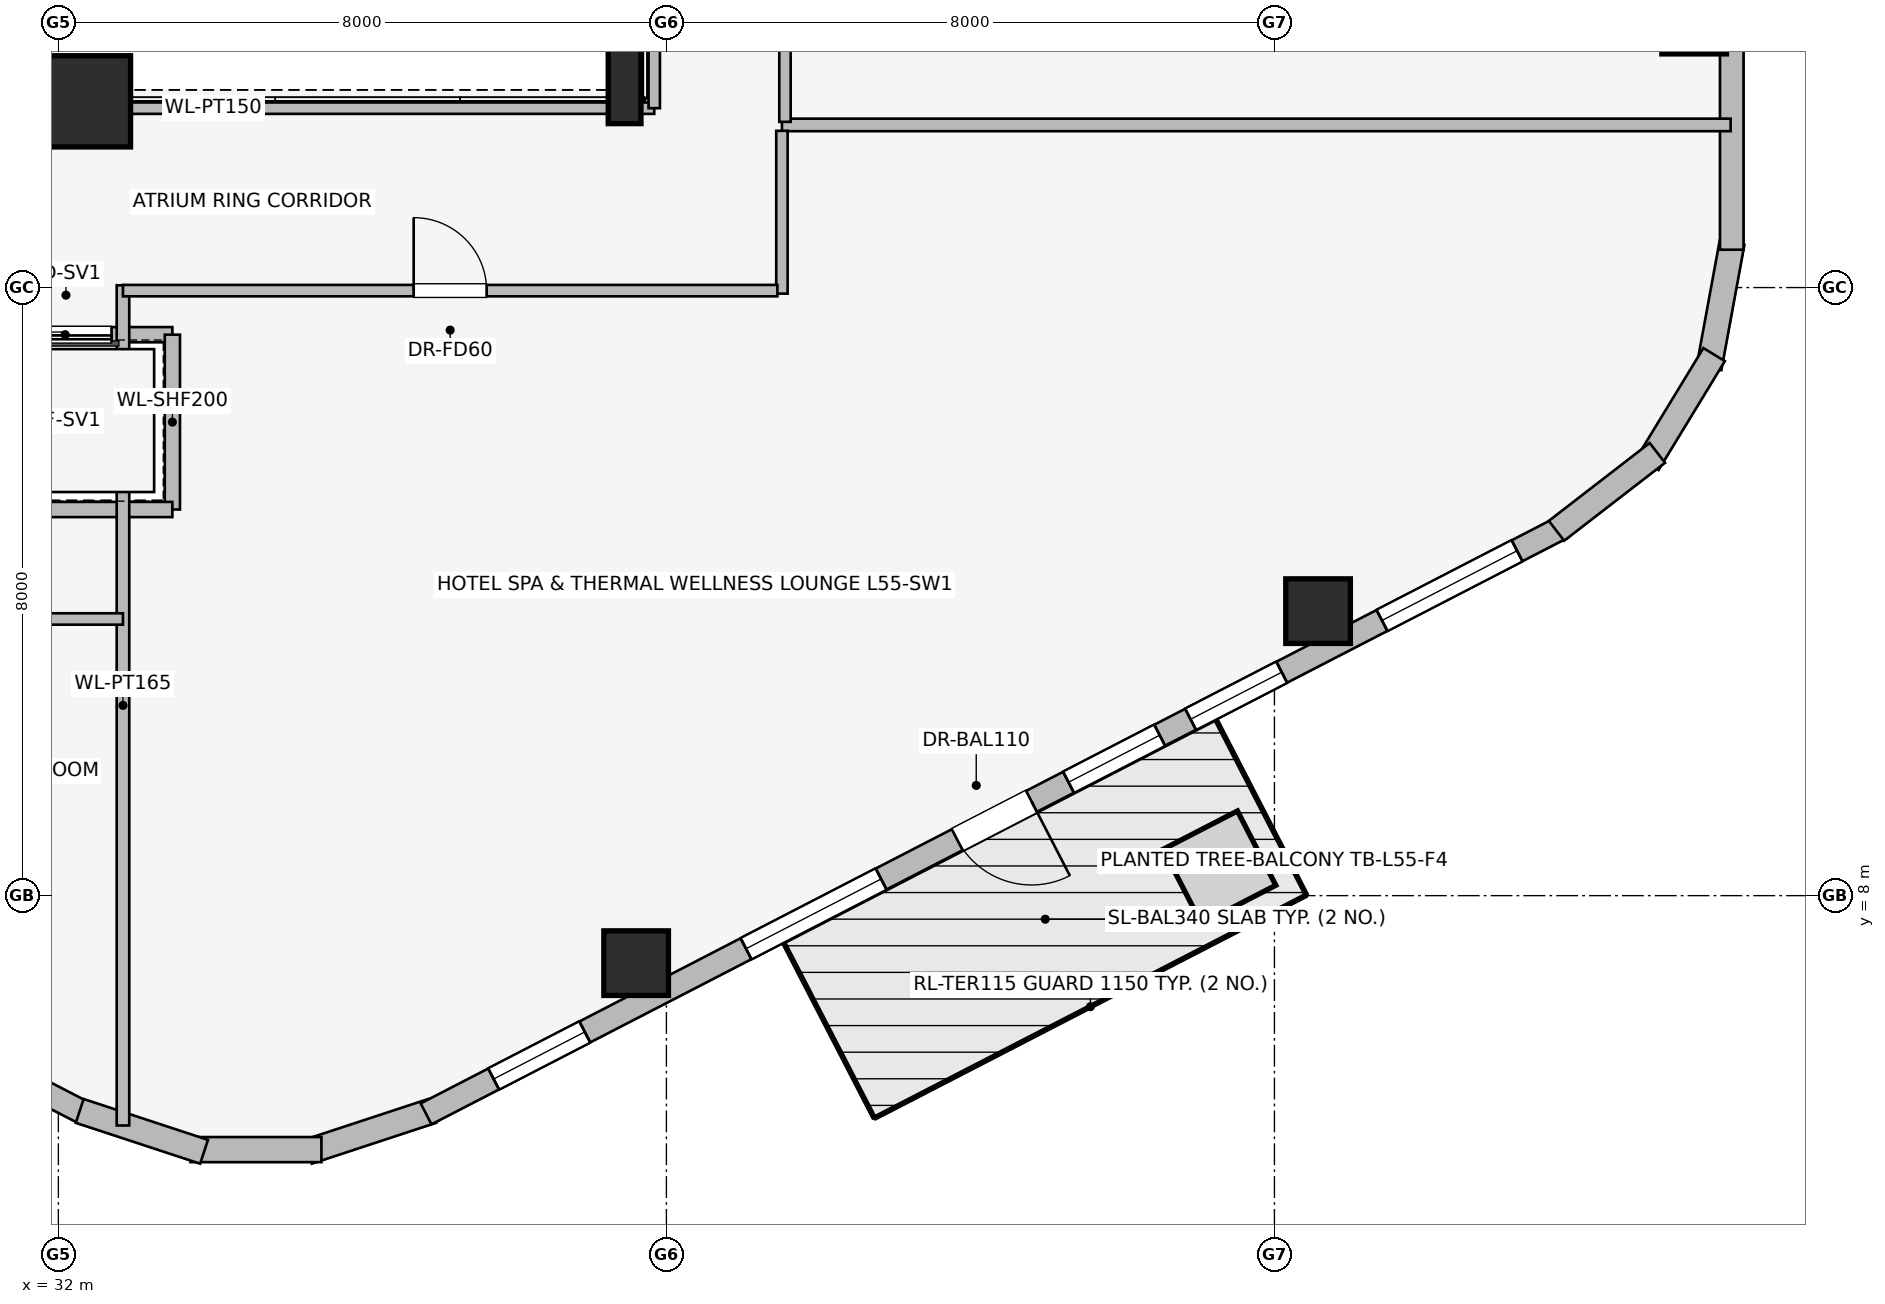
"""IFC4 building model, lengths in metres.
Left out: names, types, materials, properties, quantities, classifications, styles, units other than length and angle.
Written with IfcOpenShell. Run it as: python <this file> out.ifc"""

import sys

from ifc_helpers import new_model, si_unit, direction, frame, frame_2d, origin, origin_2d, place, context, subcontext, project, spatial, rectangle, i_section, extrude, element, fill, save


model = new_model("IFC4")
c1 = context("Model", 3, precision=1e-05, world=origin(), true_north=direction((0.0, 1.0)))
c2 = subcontext(c1, "Body", "Model", "MODEL_VIEW")
j1 = project(units=[si_unit("LENGTHUNIT", "METRE"), si_unit("PLANEANGLEUNIT", "RADIAN")], contexts=[c1])
p1 = place(None, origin())
s1 = spatial("IfcSite", under=j1, at=p1, CompositionType="ELEMENT")
p2 = place(p1, origin())
s2 = spatial("IfcBuilding", under=s1, at=p2, CompositionType="ELEMENT")
p3 = place(p2, frame((0.0, 0.0, 203.35)))
s3 = spatial("IfcBuildingStorey", under=s2, at=p3, CompositionType="ELEMENT", Elevation=203.35)
p4 = place(p3, frame((32.35, 18.45, 0.0), z_axis=(0.0, 0.0, 1.0), x_axis=(1.0, 0.0, 0.0)))
e1 = element("IfcColumn", 1, at=p4, inside=s3, PredefinedType="COLUMN", context=c2, shape_type="SweptSolid", body=[
    extrude(rectangle(XDim=1.2, YDim=1.2, at=origin_2d()), origin(), (0.0, 0.0, 1.0), 3.45),
])
for number, where, z_axis, x_axis in (
    (2, (39.602, 7.112, 0.0), (0.0, 0.0, 1.0), (1.0, 0.0, 0.0)),
    (3, (48.574, 11.743, 0.0), (0.0, 0.0, 1.0), (1.0, 0.0, 0.0)),
    (4, (53.522, 19.499, 0.0), (0.0, 0.0, 1.0), (1.0, 0.0, 0.0)),
):
    element("IfcColumn", number, at=place(p3, frame(where, z_axis=z_axis, x_axis=x_axis)), inside=s3, PredefinedType="COLUMN", context=c2, shape_type="SweptSolid", body=[
        extrude(rectangle(XDim=0.85, YDim=0.85, at=origin_2d()), origin(), (0.0, 0.0, 1.0), 3.45),
    ])
p5 = place(p3, frame((39.45, 18.65, 0.0), z_axis=(0.0, 0.0, 1.0), x_axis=(1.0, 0.0, 0.0)))
e5 = element("IfcColumn", 5, at=p5, inside=s3, PredefinedType="COLUMN", context=c2, shape_type="SweptSolid", body=[
    extrude(i_section(OverallWidth=0.431, OverallDepth=0.987, WebThickness=0.034, FlangeThickness=0.062, at=origin_2d()), origin(), (0.0, 0.0, 1.0), 3.45),
])
p6 = place(p3, frame((32.362, 5.129, 0.0), z_axis=(0.0, 0.0, 1.0), x_axis=(-0.888626188278, 0.458632202867, 0.0)))
e6 = element("IfcWall", 6, at=p6, inside=s3, PredefinedType="STANDARD", context=c2, shape_type="SweptSolid", body=[
    extrude(rectangle(XDim=16.828, YDim=0.31, at=frame_2d((8.414, 0.0))), origin(), (0.0, 0.0, 1.0), 3.19),
])
p7 = place(p6, frame((0.675, 0.0, 0.75)))
e7 = element("IfcOpeningElement", 7, at=p7, cuts=e6, PredefinedType="OPENING", context=c2, shape_type="SweptSolid", body=[
    extrude(rectangle(XDim=2.0, YDim=1.5, at=frame_2d((1.0, 0.75))), frame((0.0, 0.165, 0.0), z_axis=(0.0, -1.0, 0.0), x_axis=(1.0, 0.0, 0.0)), (0.0, 0.0, 1.0), 0.33),
])
p8 = place(p6, frame((4.75, 0.0, 0.75)))
e8 = element("IfcOpeningElement", 8, at=p8, cuts=e6, PredefinedType="OPENING", context=c2, shape_type="SweptSolid", body=[
    extrude(rectangle(XDim=1.35, YDim=1.45, at=frame_2d((0.675, 0.725))), frame((0.0, 0.165, 0.0), z_axis=(0.0, -1.0, 0.0), x_axis=(1.0, 0.0, 0.0)), (0.0, 0.0, 1.0), 0.33),
])
p9 = place(p6, frame((7.739, 0.0, 0.75)))
e9 = element("IfcOpeningElement", 9, at=p9, cuts=e6, PredefinedType="OPENING", context=c2, shape_type="SweptSolid", body=[
    extrude(rectangle(XDim=1.35, YDim=1.45, at=frame_2d((0.675, 0.725))), frame((0.0, 0.165, 0.0), z_axis=(0.0, -1.0, 0.0), x_axis=(1.0, 0.0, 0.0)), (0.0, 0.0, 1.0), 0.33),
])
p10 = place(p6, frame((10.728, 0.0, 0.75)))
e10 = element("IfcOpeningElement", 10, at=p10, cuts=e6, PredefinedType="OPENING", context=c2, shape_type="SweptSolid", body=[
    extrude(rectangle(XDim=1.35, YDim=1.45, at=frame_2d((0.675, 0.725))), frame((0.0, 0.165, 0.0), z_axis=(0.0, -1.0, 0.0), x_axis=(1.0, 0.0, 0.0)), (0.0, 0.0, 1.0), 0.33),
])
p11 = place(p6, frame((14.885, 0.0, 0.75)))
e11 = element("IfcOpeningElement", 11, at=p11, cuts=e6, PredefinedType="OPENING", context=c2, shape_type="SweptSolid", body=[
    extrude(rectangle(XDim=1.05, YDim=1.4, at=frame_2d((0.525, 0.7))), frame((0.0, 0.165, 0.0), z_axis=(0.0, -1.0, 0.0), x_axis=(1.0, 0.0, 0.0)), (0.0, 0.0, 1.0), 0.33),
])
p12 = place(p3, frame((36.919, 5.168, 0.0), z_axis=(0.0, 0.0, 1.0), x_axis=(-0.949937416267, -0.312440242569, 0.0)))
e12 = element("IfcWall", 12, at=p12, inside=s3, PredefinedType="STANDARD", context=c2, shape_type="SweptSolid", body=[
    extrude(rectangle(XDim=1.722, YDim=0.33, at=frame_2d((0.861, 0.0))), origin(), (0.0, 0.0, 1.0), 3.19),
])
p13 = place(p3, frame((35.461, 4.659, 0.0), z_axis=(0.0, 0.0, 1.0), x_axis=(-1.0, 0.0, 0.0)))
e13 = element("IfcWall", 13, at=p13, inside=s3, PredefinedType="STANDARD", context=c2, shape_type="SweptSolid", body=[
    extrude(rectangle(XDim=1.722, YDim=0.33, at=frame_2d((0.861, 0.0))), origin(), (0.0, 0.0, 1.0), 3.19),
])
p14 = place(p3, frame((33.917, 4.63, 0.0), z_axis=(0.0, 0.0, 1.0), x_axis=(-0.949937416267, 0.312440242569, 0.0)))
e14 = element("IfcWall", 14, at=p14, inside=s3, PredefinedType="STANDARD", context=c2, shape_type="SweptSolid", body=[
    extrude(rectangle(XDim=1.722, YDim=0.33, at=frame_2d((0.861, 0.0))), origin(), (0.0, 0.0, 1.0), 3.19),
])
p15 = place(p3, frame((51.792, 12.847, 0.0), z_axis=(0.0, 0.0, 1.0), x_axis=(-0.888626188278, -0.458632202867, 0.0)))
e15 = element("IfcWall", 15, at=p15, inside=s3, PredefinedType="STANDARD", context=c2, shape_type="SweptSolid", body=[
    extrude(rectangle(XDim=16.828, YDim=0.31, at=frame_2d((8.414, 0.0))), origin(), (0.0, 0.0, 1.0), 3.19),
])
p16 = place(p15, frame((7.864, 0.0, 0.0)))
e16 = element("IfcOpeningElement", 16, at=p16, cuts=e15, PredefinedType="OPENING", context=c2, shape_type="SweptSolid", body=[
    extrude(rectangle(XDim=1.1, YDim=2.04, at=frame_2d((0.55, 1.02))), frame((0.0, 0.165, 0.0), z_axis=(0.0, -1.0, 0.0), x_axis=(1.0, 0.0, 0.0)), (0.0, 0.0, 1.0), 0.33),
])
p17 = place(p15, frame((0.675, 0.0, 0.75)))
e17 = element("IfcOpeningElement", 17, at=p17, cuts=e15, PredefinedType="OPENING", context=c2, shape_type="SweptSolid", body=[
    extrude(rectangle(XDim=2.0, YDim=1.5, at=frame_2d((1.0, 0.75))), frame((0.0, 0.165, 0.0), z_axis=(0.0, -1.0, 0.0), x_axis=(1.0, 0.0, 0.0)), (0.0, 0.0, 1.0), 0.33),
])
p18 = place(p15, frame((4.159, 0.0, 0.75)))
e18 = element("IfcOpeningElement", 18, at=p18, cuts=e15, PredefinedType="OPENING", context=c2, shape_type="SweptSolid", body=[
    extrude(rectangle(XDim=1.35, YDim=1.45, at=frame_2d((0.675, 0.725))), frame((0.0, 0.165, 0.0), z_axis=(0.0, -1.0, 0.0), x_axis=(1.0, 0.0, 0.0)), (0.0, 0.0, 1.0), 0.33),
])
p19 = place(p15, frame((5.966, 0.0, 0.75)))
e19 = element("IfcOpeningElement", 19, at=p19, cuts=e15, PredefinedType="OPENING", context=c2, shape_type="SweptSolid", body=[
    extrude(rectangle(XDim=1.35, YDim=1.45, at=frame_2d((0.675, 0.725))), frame((0.0, 0.165, 0.0), z_axis=(0.0, -1.0, 0.0), x_axis=(1.0, 0.0, 0.0)), (0.0, 0.0, 1.0), 0.33),
])
p20 = place(p15, frame((10.091, 0.0, 0.75)))
e20 = element("IfcOpeningElement", 20, at=p20, cuts=e15, PredefinedType="OPENING", context=c2, shape_type="SweptSolid", body=[
    extrude(rectangle(XDim=2.0, YDim=1.5, at=frame_2d((1.0, 0.75))), frame((0.0, 0.165, 0.0), z_axis=(0.0, -1.0, 0.0), x_axis=(1.0, 0.0, 0.0)), (0.0, 0.0, 1.0), 0.33),
])
p21 = place(p15, frame((14.478, 0.0, 0.75)))
e21 = element("IfcOpeningElement", 21, at=p21, cuts=e15, PredefinedType="OPENING", context=c2, shape_type="SweptSolid", body=[
    extrude(rectangle(XDim=1.35, YDim=1.45, at=frame_2d((0.675, 0.725))), frame((0.0, 0.165, 0.0), z_axis=(0.0, -1.0, 0.0), x_axis=(1.0, 0.0, 0.0)), (0.0, 0.0, 1.0), 0.33),
])
p22 = place(p3, frame((54.021, 16.592, 0.0), z_axis=(0.0, 0.0, 1.0), x_axis=(-0.180717642671, -0.983535019014, 0.0)))
e22 = element("IfcWall", 22, at=p22, inside=s3, PredefinedType="STANDARD", context=c2, shape_type="SweptSolid", body=[
    extrude(rectangle(XDim=1.677, YDim=0.33, at=frame_2d((0.838, 0.0))), origin(), (0.0, 0.0, 1.0), 3.19),
])
p23 = place(p3, frame((53.785, 15.118, 0.0), z_axis=(0.0, 0.0, 1.0), x_axis=(-0.520219286058, -0.85403272444, 0.0)))
e23 = element("IfcWall", 23, at=p23, inside=s3, PredefinedType="STANDARD", context=c2, shape_type="SweptSolid", body=[
    extrude(rectangle(XDim=1.678, YDim=0.33, at=frame_2d((0.839, 0.0))), origin(), (0.0, 0.0, 1.0), 3.19),
])
p24 = place(p3, frame((53.038, 13.825, 0.0), z_axis=(0.0, 0.0, 1.0), x_axis=(-0.791464279355, -0.611215423976, 0.0)))
e24 = element("IfcWall", 24, at=p24, inside=s3, PredefinedType="STANDARD", context=c2, shape_type="SweptSolid", body=[
    extrude(rectangle(XDim=1.677, YDim=0.33, at=frame_2d((0.838, 0.0))), origin(), (0.0, 0.0, 1.0), 3.19),
])
p25 = place(p3, frame((54.017, 31.502, 0.0), z_axis=(0.0, 0.0, 1.0), x_axis=(0.0, -1.0, 0.0)))
e25 = element("IfcWall", 25, at=p25, inside=s3, PredefinedType="STANDARD", context=c2, shape_type="SweptSolid", body=[
    extrude(rectangle(XDim=15.004, YDim=0.31, at=frame_2d((7.502, 0.0))), origin(), (0.0, 0.0, 1.0), 3.19),
])
p26 = place(p25, frame((4.007, 0.0, 0.75)))
e26 = element("IfcOpeningElement", 26, at=p26, cuts=e25, PredefinedType="OPENING", context=c2, shape_type="SweptSolid", body=[
    extrude(rectangle(XDim=1.05, YDim=1.4, at=frame_2d((0.525, 0.7))), frame((0.0, 0.165, 0.0), z_axis=(0.0, -1.0, 0.0), x_axis=(1.0, 0.0, 0.0)), (0.0, 0.0, 1.0), 0.33),
])
p27 = place(p25, frame((6.833, 0.0, 0.75)))
e27 = element("IfcOpeningElement", 27, at=p27, cuts=e25, PredefinedType="OPENING", context=c2, shape_type="SweptSolid", body=[
    extrude(rectangle(XDim=1.35, YDim=1.45, at=frame_2d((0.675, 0.725))), frame((0.0, 0.165, 0.0), z_axis=(0.0, -1.0, 0.0), x_axis=(1.0, 0.0, 0.0)), (0.0, 0.0, 1.0), 0.33),
])
p28 = place(p25, frame((9.953, 0.0, 0.75)))
e28 = element("IfcOpeningElement", 28, at=p28, cuts=e25, PredefinedType="OPENING", context=c2, shape_type="SweptSolid", body=[
    extrude(rectangle(XDim=1.05, YDim=1.4, at=frame_2d((0.525, 0.7))), frame((0.0, 0.165, 0.0), z_axis=(0.0, -1.0, 0.0), x_axis=(1.0, 0.0, 0.0)), (0.0, 0.0, 1.0), 0.33),
])
p29 = place(p3, frame((33.5, 15.38, 0.0), z_axis=(0.0, 0.0, 1.0), x_axis=(-1.0, 0.0, 0.0)))
e29 = element("IfcWall", 29, at=p29, inside=s3, PredefinedType="PARTITIONING", context=c2, shape_type="SweptSolid", body=[
    extrude(rectangle(XDim=2.82, YDim=0.2, at=frame_2d((1.41, 0.0))), origin(), (0.0, 0.0, 1.0), 3.19),
])
p30 = place(p29, frame((0.8, 0.0, 0.0)))
e30 = element("IfcOpeningElement", 30, at=p30, cuts=e29, PredefinedType="OPENING", context=c2, shape_type="SweptSolid", body=[
    extrude(rectangle(XDim=1.2, YDim=2.2, at=frame_2d((0.6, 1.1))), frame((0.0, 0.11, 0.0), z_axis=(0.0, -1.0, 0.0), x_axis=(1.0, 0.0, 0.0)), (0.0, 0.0, 1.0), 0.22),
])
p31 = place(p3, frame((33.5, 13.08, 0.0), z_axis=(0.0, 0.0, 1.0), x_axis=(0.0, 1.0, 0.0)))
e31 = element("IfcWall", 31, at=p31, inside=s3, PredefinedType="PARTITIONING", context=c2, shape_type="SweptSolid", body=[
    extrude(rectangle(XDim=2.3, YDim=0.2, at=frame_2d((1.15, 0.0))), origin(), (0.0, 0.0, 1.0), 3.19),
])
p32 = place(p3, frame((30.879, 13.08, 0.0), z_axis=(0.0, 0.0, 1.0), x_axis=(1.0, 0.0, 0.0)))
e32 = element("IfcWall", 32, at=p32, inside=s3, PredefinedType="PARTITIONING", context=c2, shape_type="SweptSolid", body=[
    extrude(rectangle(XDim=2.621, YDim=0.2, at=frame_2d((1.311, 0.0))), origin(), (0.0, 0.0, 1.0), 3.19),
])
p33 = place(p3, frame((27.675, 18.36, 0.0), z_axis=(0.0, 0.0, 1.0), x_axis=(1.0, 0.0, 0.0)))
e33 = element("IfcWall", 33, at=p33, inside=s3, PredefinedType="PARTITIONING", context=c2, shape_type="SweptSolid", body=[
    extrude(rectangle(XDim=12.165, YDim=0.15, at=frame_2d((6.083, 0.0))), origin(), (0.0, 0.0, 1.0), 2.331),
])
p34 = place(p3, frame((39.84, 18.36, 0.0), z_axis=(0.0, 0.0, 1.0), x_axis=(0.0, 1.0, 0.0)))
e34 = element("IfcWall", 34, at=p34, inside=s3, PredefinedType="PARTITIONING", context=c2, shape_type="SweptSolid", body=[
    extrude(rectangle(XDim=11.28, YDim=0.15, at=frame_2d((5.64, 0.0))), origin(), (0.0, 0.0, 1.0), 3.19),
])
p35 = place(p3, frame((32.85, 4.976, 0.0), z_axis=(0.0, 0.0, 1.0), x_axis=(0.0, 1.0, 0.0)))
e35 = element("IfcWall", 35, at=p35, inside=s3, PredefinedType="PARTITIONING", context=c2, shape_type="SweptSolid", body=[
    extrude(rectangle(XDim=11.054, YDim=0.165, at=frame_2d((5.527, 0.0))), origin(), (0.0, 0.0, 1.0), 3.19),
])
p36 = place(p3, frame((19.757, 11.64, 0.0), z_axis=(0.0, 0.0, 1.0), x_axis=(1.0, 0.0, 0.0)))
e36 = element("IfcWall", 36, at=p36, inside=s3, PredefinedType="PARTITIONING", context=c2, shape_type="SweptSolid", body=[
    extrude(rectangle(XDim=13.093, YDim=0.15, at=frame_2d((6.546, 0.0))), origin(), (0.0, 0.0, 1.0), 3.19),
])
p37 = place(p36, frame((3.243, 0.0, 0.0)))
e37 = element("IfcOpeningElement", 37, at=p37, cuts=e36, PredefinedType="OPENING", context=c2, shape_type="SweptSolid", body=[
    extrude(rectangle(XDim=0.9, YDim=2.0, at=frame_2d((0.45, 1.0))), frame((0.0, 0.085, 0.0), z_axis=(0.0, -1.0, 0.0), x_axis=(1.0, 0.0, 0.0)), (0.0, 0.0, 1.0), 0.17),
])
p38 = place(p3, frame((41.52, 18.14, 0.0), z_axis=(0.0, 0.0, 1.0), x_axis=(1.0, 0.0, 0.0)))
e38 = element("IfcWall", 38, at=p38, inside=s3, PredefinedType="PARTITIONING", context=c2, shape_type="SweptSolid", body=[
    extrude(rectangle(XDim=12.482, YDim=0.165, at=frame_2d((6.241, 0.0))), origin(), (0.0, 0.0, 1.0), 3.19),
])
p39 = place(p3, frame((41.56, 18.18, 0.0), z_axis=(0.0, 0.0, 1.0), x_axis=(0.0, 1.0, 0.0)))
e39 = element("IfcWall", 39, at=p39, inside=s3, PredefinedType="PARTITIONING", context=c2, shape_type="SweptSolid", body=[
    extrude(rectangle(XDim=4.149, YDim=0.15, at=frame_2d((2.075, 0.0))), origin(), (0.0, 0.0, 1.0), 3.19),
])
p40 = place(p39, frame((1.595, 0.0, 0.0)))
e40 = element("IfcOpeningElement", 40, at=p40, cuts=e39, PredefinedType="OPENING", context=c2, shape_type="SweptSolid", body=[
    extrude(rectangle(XDim=0.96, YDim=2.0, at=frame_2d((0.48, 1.0))), frame((0.0, 0.085, 0.0), z_axis=(0.0, -1.0, 0.0), x_axis=(1.0, 0.0, 0.0)), (0.0, 0.0, 1.0), 0.17),
])
p41 = place(p3, frame((41.52, 15.92, 0.0), z_axis=(0.0, 0.0, 1.0), x_axis=(0.0, 1.0, 0.0)))
e41 = element("IfcWall", 41, at=p41, inside=s3, PredefinedType="PARTITIONING", context=c2, shape_type="SweptSolid", body=[
    extrude(rectangle(XDim=2.142, YDim=0.15, at=frame_2d((1.071, 0.0))), origin(), (0.0, 0.0, 1.0), 3.19),
])
p42 = place(p3, frame((32.85, 15.96, 0.0), z_axis=(0.0, 0.0, 1.0), x_axis=(1.0, 0.0, 0.0)))
e42 = element("IfcWall", 42, at=p42, inside=s3, PredefinedType="PARTITIONING", context=c2, shape_type="SweptSolid", body=[
    extrude(rectangle(XDim=8.61, YDim=0.15, at=frame_2d((4.305, 0.0))), origin(), (0.0, 0.0, 1.0), 3.19),
])
p43 = place(p42, frame((3.825, 0.0, 0.0)))
e43 = element("IfcOpeningElement", 43, at=p43, cuts=e42, PredefinedType="OPENING", context=c2, shape_type="SweptSolid", body=[
    extrude(rectangle(XDim=0.96, YDim=2.0, at=frame_2d((0.48, 1.0))), frame((0.0, 0.085, 0.0), z_axis=(0.0, -1.0, 0.0), x_axis=(1.0, 0.0, 0.0)), (0.0, 0.0, 1.0), 0.17),
])
p44 = place(p16, origin())
e44 = element("IfcDoor", 44, at=p44, inside=s3, OperationType="SINGLE_SWING_LEFT", PredefinedType="DOOR", context=c2, shape_type="SweptSolid", body=[
    extrude(rectangle(XDim=1.1, YDim=2.04, at=frame_2d((0.55, 1.02))), frame((0.0, 0.025, 0.0), z_axis=(0.0, -1.0, 0.0), x_axis=(1.0, 0.0, 0.0)), (0.0, 0.0, 1.0), 0.05),
])
fill(e16, e44)
p45 = place(p17, origin())
e45 = element("IfcWindow", 45, at=p45, inside=s3, PartitioningType="SINGLE_PANEL", PredefinedType="WINDOW", context=c2, shape_type="SweptSolid", body=[
    extrude(rectangle(XDim=2.0, YDim=1.5, at=frame_2d((1.0, 0.75))), frame((0.0, 0.03, 0.0), z_axis=(0.0, -1.0, 0.0), x_axis=(1.0, 0.0, 0.0)), (0.0, 0.0, 1.0), 0.06),
])
fill(e17, e45)
p46 = place(p18, origin())
e46 = element("IfcWindow", 46, at=p46, inside=s3, PartitioningType="SINGLE_PANEL", PredefinedType="WINDOW", context=c2, shape_type="SweptSolid", body=[
    extrude(rectangle(XDim=1.35, YDim=1.45, at=frame_2d((0.675, 0.725))), frame((0.0, 0.03, 0.0), z_axis=(0.0, -1.0, 0.0), x_axis=(1.0, 0.0, 0.0)), (0.0, 0.0, 1.0), 0.06),
])
fill(e18, e46)
p47 = place(p19, origin())
e47 = element("IfcWindow", 47, at=p47, inside=s3, PartitioningType="SINGLE_PANEL", PredefinedType="WINDOW", context=c2, shape_type="SweptSolid", body=[
    extrude(rectangle(XDim=1.35, YDim=1.45, at=frame_2d((0.675, 0.725))), frame((0.0, 0.03, 0.0), z_axis=(0.0, -1.0, 0.0), x_axis=(1.0, 0.0, 0.0)), (0.0, 0.0, 1.0), 0.06),
])
fill(e19, e47)
p48 = place(p20, origin())
e48 = element("IfcWindow", 48, at=p48, inside=s3, PartitioningType="SINGLE_PANEL", PredefinedType="WINDOW", context=c2, shape_type="SweptSolid", body=[
    extrude(rectangle(XDim=2.0, YDim=1.5, at=frame_2d((1.0, 0.75))), frame((0.0, 0.03, 0.0), z_axis=(0.0, -1.0, 0.0), x_axis=(1.0, 0.0, 0.0)), (0.0, 0.0, 1.0), 0.06),
])
fill(e20, e48)
p49 = place(p21, origin())
e49 = element("IfcWindow", 49, at=p49, inside=s3, PartitioningType="SINGLE_PANEL", PredefinedType="WINDOW", context=c2, shape_type="SweptSolid", body=[
    extrude(rectangle(XDim=1.35, YDim=1.45, at=frame_2d((0.675, 0.725))), frame((0.0, 0.03, 0.0), z_axis=(0.0, -1.0, 0.0), x_axis=(1.0, 0.0, 0.0)), (0.0, 0.0, 1.0), 0.06),
])
fill(e21, e49)
p50 = place(p30, origin())
e50 = element("IfcDoor", 50, at=p50, inside=s3, OperationType="SLIDING_TO_RIGHT", PredefinedType="DOOR", context=c2, shape_type="SweptSolid", body=[
    extrude(rectangle(XDim=1.2, YDim=2.2, at=frame_2d((0.6, 1.1))), frame((0.0, 0.025, 0.0), z_axis=(0.0, -1.0, 0.0), x_axis=(1.0, 0.0, 0.0)), (0.0, 0.0, 1.0), 0.05),
])
fill(e30, e50)
p51 = place(p43, origin())
e51 = element("IfcDoor", 51, at=p51, inside=s3, OperationType="SINGLE_SWING_LEFT", PredefinedType="DOOR", context=c2, shape_type="SweptSolid", body=[
    extrude(rectangle(XDim=0.96, YDim=2.0, at=frame_2d((0.48, 1.0))), frame((0.0, 0.025, 0.0), z_axis=(0.0, -1.0, 0.0), x_axis=(1.0, 0.0, 0.0)), (0.0, 0.0, 1.0), 0.05),
])
fill(e43, e51)
save(model, sys.argv[1])
